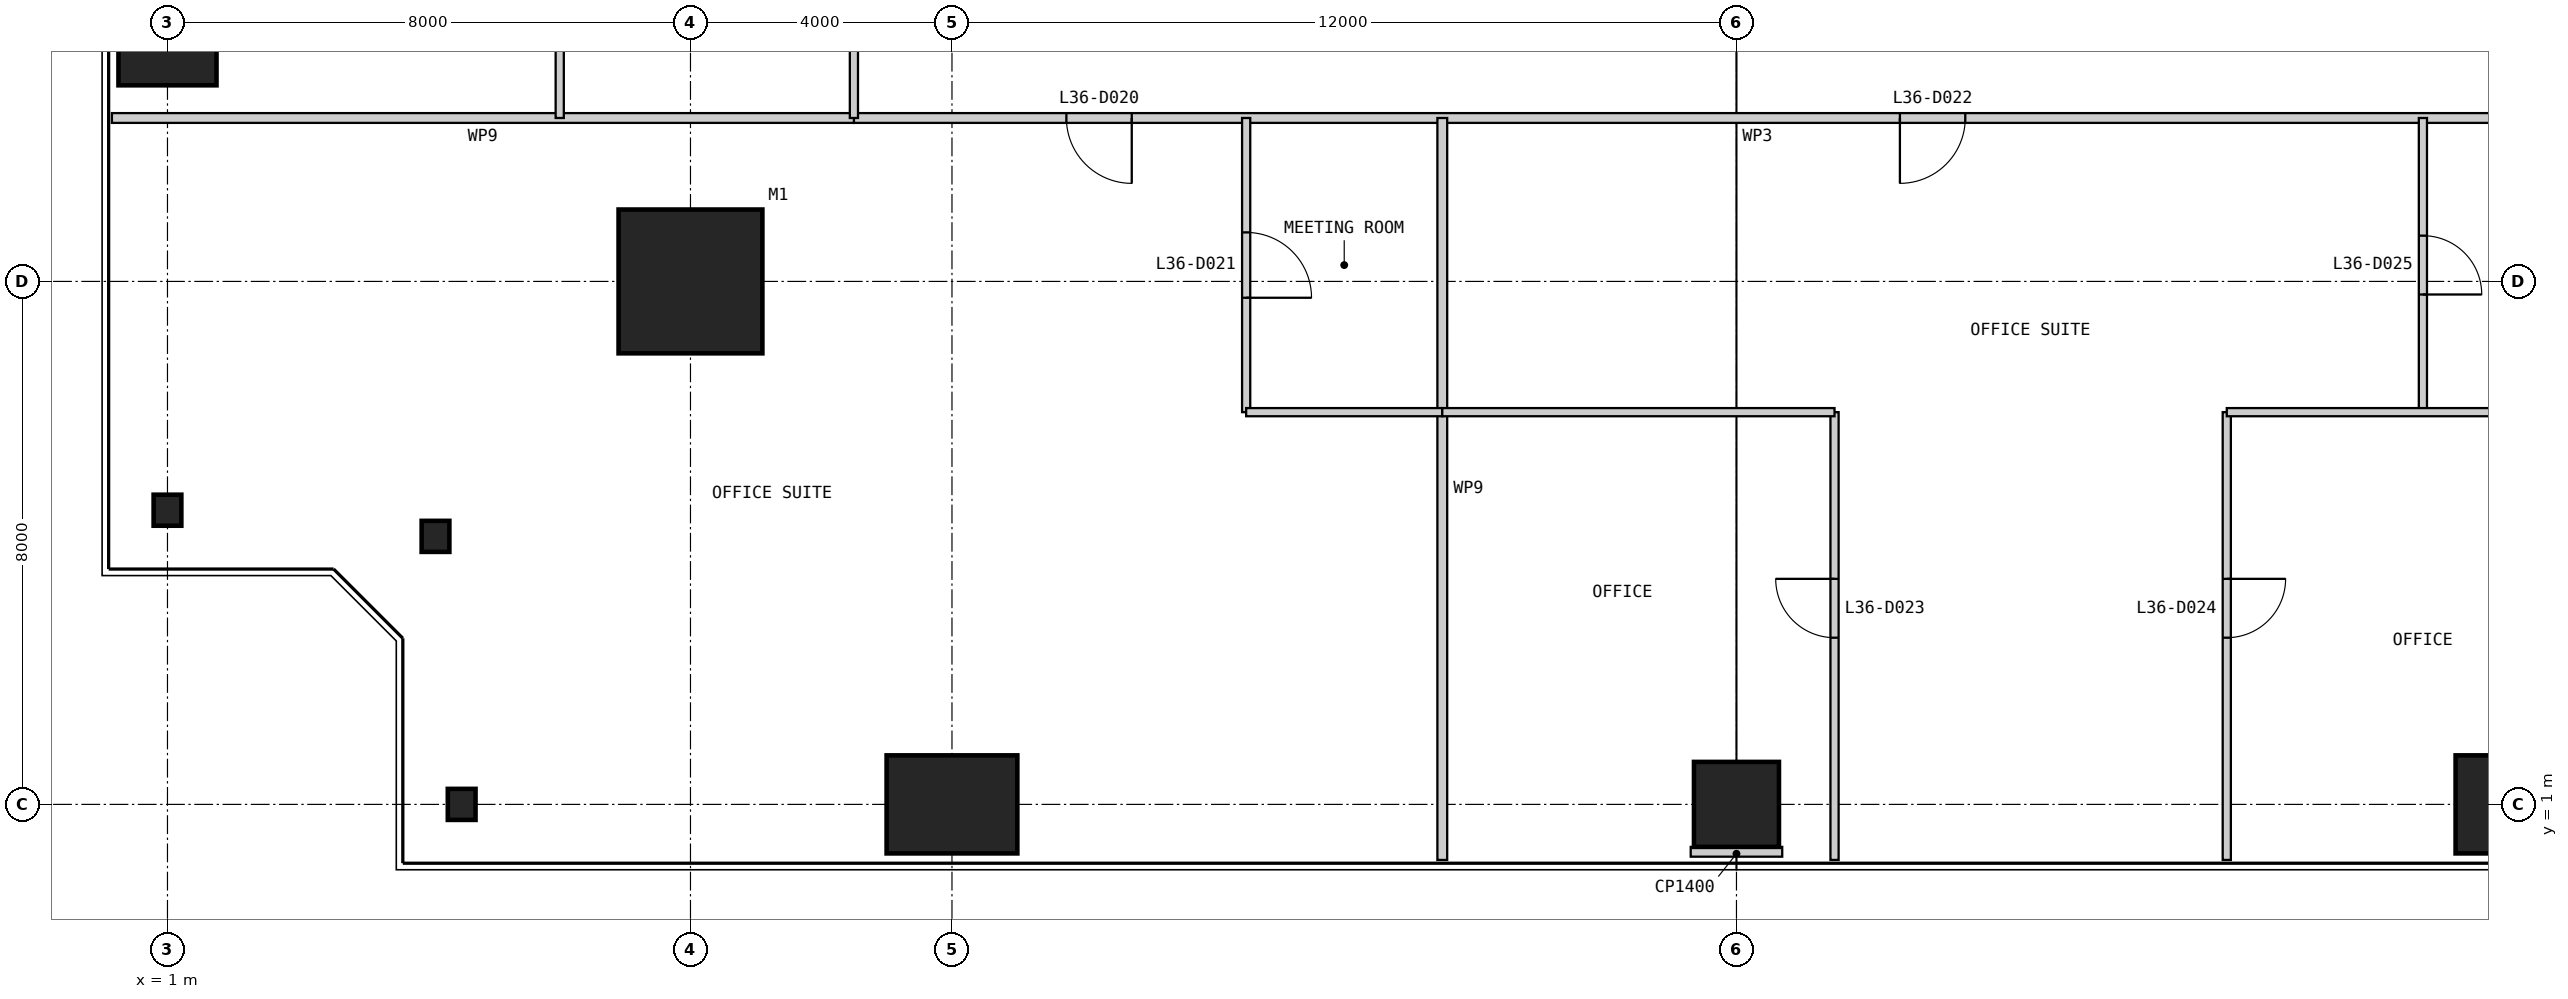
"""IFC4 building model, lengths in metres.
Left out: names, types, materials, properties, quantities, classifications, styles, units other than length and angle.
Written with IfcOpenShell. Run it as: python <this file> out.ifc"""

import sys

from ifc_helpers import new_model, si_unit, direction, frame, frame_2d, origin, origin_2d, place, context, subcontext, project, spatial, rectangle, i_section, extrude, element, fill, save


model = new_model("IFC4")
c1 = context("Model", 3, precision=1e-05, world=origin(), true_north=direction((0.0, 1.0)))
c2 = subcontext(c1, "Body", "Model", "MODEL_VIEW")
j1 = project(units=[si_unit("LENGTHUNIT", "METRE"), si_unit("PLANEANGLEUNIT", "RADIAN")], contexts=[c1])
p1 = place(None, origin())
s1 = spatial("IfcSite", under=j1, at=p1, CompositionType="ELEMENT")
p2 = place(p1, origin())
s2 = spatial("IfcBuilding", under=s1, at=p2, CompositionType="ELEMENT")
p3 = place(p2, frame((0.0, 0.0, 154.4)))
s3 = spatial("IfcBuildingStorey", under=s2, at=p3, CompositionType="ELEMENT", Elevation=154.4)
p4 = place(p3, frame((9.0, 9.0, 0.0), z_axis=(0.0, 0.0, 1.0), x_axis=(1.0, 0.0, 0.0)))
e1 = element("IfcColumn", 1, at=p4, inside=s3, PredefinedType="COLUMN", context=c2, shape_type="SweptSolid", body=[
    extrude(rectangle(XDim=2.2, YDim=2.2, at=origin_2d()), origin(), (0.0, 0.0, 1.0), 4.0),
])
p5 = place(p3, frame((5.5, 1.0, 0.0), z_axis=(0.0, 0.0, 1.0), x_axis=(1.0, 0.0, 0.0)))
e2 = element("IfcColumn", 2, at=p5, inside=s3, PredefinedType="COLUMN", context=c2, shape_type="SweptSolid", body=[
    extrude(i_section(OverallWidth=0.424, OverallDepth=0.475, WebThickness=0.048, FlangeThickness=0.077, at=origin_2d()), origin(), (0.0, 0.0, 1.0), 4.0),
])
p6 = place(p3, frame((13.0, 1.0, 0.0), z_axis=(0.0, 0.0, 1.0), x_axis=(1.0, 0.0, 0.0)))
e3 = element("IfcColumn", 3, at=p6, inside=s3, PredefinedType="COLUMN", context=c2, shape_type="SweptSolid", body=[
    extrude(rectangle(XDim=2.0, YDim=1.5, at=origin_2d()), origin(), (0.0, 0.0, 1.0), 4.0),
])
p7 = place(p3, frame((25.0, 1.0, 0.0), z_axis=(0.0, 0.0, 1.0), x_axis=(1.0, 0.0, 0.0)))
e4 = element("IfcColumn", 4, at=p7, inside=s3, PredefinedType="COLUMN", context=c2, shape_type="SweptSolid", body=[
    extrude(rectangle(XDim=1.3, YDim=1.3, at=origin_2d()), origin(), (0.0, 0.0, 1.0), 4.0),
])
p8 = place(p3, frame((37.0, 1.0, 0.0), z_axis=(0.0, 0.0, 1.0), x_axis=(1.0, 0.0, 0.0)))
e5 = element("IfcColumn", 5, at=p8, inside=s3, PredefinedType="COLUMN", context=c2, shape_type="SweptSolid", body=[
    extrude(rectangle(XDim=2.0, YDim=1.5, at=origin_2d()), origin(), (0.0, 0.0, 1.0), 4.0),
])
p9 = place(p3, frame((1.0, 13.0, 0.0), z_axis=(0.0, 0.0, 1.0), x_axis=(1.0, 0.0, 0.0)))
e6 = element("IfcColumn", 6, at=p9, inside=s3, PredefinedType="COLUMN", context=c2, shape_type="SweptSolid", body=[
    extrude(rectangle(XDim=1.5, YDim=2.0, at=origin_2d()), origin(), (0.0, 0.0, 1.0), 4.0),
])
for number, where, z_axis, x_axis in (
    (7, (1.0, 5.5, 0.0), (0.0, 0.0, 1.0), (1.0, 0.0, 0.0)),
    (8, (5.1, 5.1, 0.0), (0.0, 0.0, 1.0), (1.0, 0.0, 0.0)),
):
    element("IfcColumn", number, at=place(p3, frame(where, z_axis=z_axis, x_axis=x_axis)), inside=s3, PredefinedType="COLUMN", context=c2, shape_type="SweptSolid", body=[
        extrude(i_section(OverallWidth=0.424, OverallDepth=0.475, WebThickness=0.048, FlangeThickness=0.077, at=origin_2d()), origin(), (0.0, 0.0, 1.0), 4.0),
    ])
p10 = place(p3, frame((11.5, 11.5, 0.0), z_axis=(0.0, 0.0, 1.0), x_axis=(1.0, 0.0, 0.0)))
e9 = element("IfcWall", 9, at=p10, inside=s3, PredefinedType="PARTITIONING", context=c2, shape_type="SweptSolid", body=[
    extrude(rectangle(XDim=27.0, YDim=0.15, at=frame_2d((13.5, 0.0))), origin(), (0.0, 0.0, 1.0), 3.85),
])
p11 = place(p10, frame((3.25, 0.0, 0.0)))
e10 = element("IfcOpeningElement", 10, at=p11, cuts=e9, PredefinedType="OPENING", context=c2, shape_type="SweptSolid", body=[
    extrude(rectangle(XDim=1.0, YDim=2.2, at=frame_2d((0.5, 1.1))), frame((0.0, 0.085, 0.0), z_axis=(0.0, -1.0, 0.0), x_axis=(1.0, 0.0, 0.0)), (0.0, 0.0, 1.0), 0.17),
])
p12 = place(p10, frame((16.0, 0.0, 0.0)))
e11 = element("IfcOpeningElement", 11, at=p12, cuts=e9, PredefinedType="OPENING", context=c2, shape_type="SweptSolid", body=[
    extrude(rectangle(XDim=1.0, YDim=2.2, at=frame_2d((0.5, 1.1))), frame((0.0, 0.085, 0.0), z_axis=(0.0, -1.0, 0.0), x_axis=(1.0, 0.0, 0.0)), (0.0, 0.0, 1.0), 0.17),
])
p13 = place(p3, frame((0.15, 11.5, 0.0), z_axis=(0.0, 0.0, 1.0), x_axis=(1.0, 0.0, 0.0)))
e12 = element("IfcWall", 12, at=p13, inside=s3, PredefinedType="PARTITIONING", context=c2, shape_type="SweptSolid", body=[
    extrude(rectangle(XDim=11.35, YDim=0.15, at=frame_2d((5.675, 0.0))), origin(), (0.0, 0.0, 1.0), 3.85),
])
p14 = place(p3, frame((17.5, 7.0, 0.0), z_axis=(0.0, 0.0, 1.0), x_axis=(0.0, 1.0, 0.0)))
e13 = element("IfcWall", 13, at=p14, inside=s3, PredefinedType="PARTITIONING", context=c2, shape_type="SweptSolid", body=[
    extrude(rectangle(XDim=4.5, YDim=0.125, at=frame_2d((2.25, 0.0))), origin(), (0.0, 0.0, 1.0), 3.85),
])
p15 = place(p14, frame((1.75, 0.0, 0.0)))
e14 = element("IfcOpeningElement", 14, at=p15, cuts=e13, PredefinedType="OPENING", context=c2, shape_type="SweptSolid", body=[
    extrude(rectangle(XDim=1.0, YDim=2.2, at=frame_2d((0.5, 1.1))), frame((0.0, 0.073, 0.0), z_axis=(0.0, -1.0, 0.0), x_axis=(1.0, 0.0, 0.0)), (0.0, 0.0, 1.0), 0.145),
])
p16 = place(p3, frame((20.5, 0.15, 0.0), z_axis=(0.0, 0.0, 1.0), x_axis=(0.0, 1.0, 0.0)))
e15 = element("IfcWall", 15, at=p16, inside=s3, PredefinedType="PARTITIONING", context=c2, shape_type="SweptSolid", body=[
    extrude(rectangle(XDim=11.35, YDim=0.15, at=frame_2d((5.675, 0.0))), origin(), (0.0, 0.0, 1.0), 3.85),
])
p17 = place(p3, frame((26.5, 0.15, 0.0), z_axis=(0.0, 0.0, 1.0), x_axis=(0.0, 1.0, 0.0)))
e16 = element("IfcWall", 16, at=p17, inside=s3, PredefinedType="PARTITIONING", context=c2, shape_type="SweptSolid", body=[
    extrude(rectangle(XDim=6.85, YDim=0.125, at=frame_2d((3.425, 0.0))), origin(), (0.0, 0.0, 1.0), 3.85),
])
p18 = place(p17, frame((3.4, 0.0, 0.0)))
e17 = element("IfcOpeningElement", 17, at=p18, cuts=e16, PredefinedType="OPENING", context=c2, shape_type="SweptSolid", body=[
    extrude(rectangle(XDim=0.9, YDim=2.2, at=frame_2d((0.45, 1.1))), frame((0.0, 0.073, 0.0), z_axis=(0.0, -1.0, 0.0), x_axis=(1.0, 0.0, 0.0)), (0.0, 0.0, 1.0), 0.145),
])
p19 = place(p3, frame((32.5, 0.15, 0.0), z_axis=(0.0, 0.0, 1.0), x_axis=(0.0, 1.0, 0.0)))
e18 = element("IfcWall", 18, at=p19, inside=s3, PredefinedType="PARTITIONING", context=c2, shape_type="SweptSolid", body=[
    extrude(rectangle(XDim=6.85, YDim=0.125, at=frame_2d((3.425, 0.0))), origin(), (0.0, 0.0, 1.0), 3.85),
])
p20 = place(p19, frame((3.4, 0.0, 0.0)))
e19 = element("IfcOpeningElement", 19, at=p20, cuts=e18, PredefinedType="OPENING", context=c2, shape_type="SweptSolid", body=[
    extrude(rectangle(XDim=0.9, YDim=2.2, at=frame_2d((0.45, 1.1))), frame((0.0, 0.073, 0.0), z_axis=(0.0, -1.0, 0.0), x_axis=(1.0, 0.0, 0.0)), (0.0, 0.0, 1.0), 0.145),
])
p21 = place(p3, frame((35.5, 7.0, 0.0), z_axis=(0.0, 0.0, 1.0), x_axis=(0.0, 1.0, 0.0)))
e20 = element("IfcWall", 20, at=p21, inside=s3, PredefinedType="PARTITIONING", context=c2, shape_type="SweptSolid", body=[
    extrude(rectangle(XDim=4.5, YDim=0.125, at=frame_2d((2.25, 0.0))), origin(), (0.0, 0.0, 1.0), 3.85),
])
p22 = place(p21, frame((1.8, 0.0, 0.0)))
e21 = element("IfcOpeningElement", 21, at=p22, cuts=e20, PredefinedType="OPENING", context=c2, shape_type="SweptSolid", body=[
    extrude(rectangle(XDim=0.9, YDim=2.2, at=frame_2d((0.45, 1.1))), frame((0.0, 0.073, 0.0), z_axis=(0.0, -1.0, 0.0), x_axis=(1.0, 0.0, 0.0)), (0.0, 0.0, 1.0), 0.145),
])
p23 = place(p3, frame((17.5, 7.0, 0.0), z_axis=(0.0, 0.0, 1.0), x_axis=(1.0, 0.0, 0.0)))
e22 = element("IfcWall", 22, at=p23, inside=s3, PredefinedType="PARTITIONING", context=c2, shape_type="SweptSolid", body=[
    extrude(rectangle(XDim=3.0, YDim=0.125, at=frame_2d((1.5, 0.0))), origin(), (0.0, 0.0, 1.0), 3.85),
])
for number, where, z_axis, x_axis in (
    (23, (20.5, 7.0, 0.0), (0.0, 0.0, 1.0), (1.0, 0.0, 0.0)),
    (24, (32.5, 7.0, 0.0), (0.0, 0.0, 1.0), (1.0, 0.0, 0.0)),
):
    element("IfcWall", number, at=place(p3, frame(where, z_axis=z_axis, x_axis=x_axis)), inside=s3, PredefinedType="PARTITIONING", context=c2, shape_type="SweptSolid", body=[
        extrude(rectangle(XDim=6.0, YDim=0.125, at=frame_2d((3.0, 0.0))), origin(), (0.0, 0.0, 1.0), 3.85),
    ])
p24 = place(p3, frame((7.0, 17.5, 0.0), z_axis=(0.0, 0.0, 1.0), x_axis=(0.0, -1.0, 0.0)))
e25 = element("IfcWall", 25, at=p24, inside=s3, PredefinedType="PARTITIONING", context=c2, shape_type="SweptSolid", body=[
    extrude(rectangle(XDim=6.0, YDim=0.125, at=frame_2d((3.0, 0.0))), origin(), (0.0, 0.0, 1.0), 3.238),
])
p25 = place(p3, frame((11.5, 14.5, 0.0), z_axis=(0.0, 0.0, 1.0), x_axis=(0.0, -1.0, 0.0)))
e26 = element("IfcWall", 26, at=p25, inside=s3, PredefinedType="PARTITIONING", context=c2, shape_type="SweptSolid", body=[
    extrude(rectangle(XDim=3.0, YDim=0.125, at=frame_2d((1.5, 0.0))), origin(), (0.0, 0.0, 1.0), 3.85),
])
p26 = place(p3, frame((25.0, 0.2, 0.0), z_axis=(0.0, 0.0, 1.0), x_axis=(0.0, 1.0, 0.0)))
e27 = element("IfcWall", 27, at=p26, inside=s3, PredefinedType="PARTITIONING", context=c2, shape_type="SweptSolid", body=[
    extrude(rectangle(XDim=0.15, YDim=1.4, at=frame_2d((0.075, 0.0))), origin(), (0.0, 0.0, 1.0), 3.85),
])
p27 = place(p11, frame((1.0, 0.0, 0.0), z_axis=(0.0, 0.0, 1.0), x_axis=(-1.0, 0.0, 0.0)))
e28 = element("IfcDoor", 28, at=p27, inside=s3, OperationType="SINGLE_SWING_LEFT", PredefinedType="DOOR", context=c2, shape_type="SweptSolid", body=[
    extrude(rectangle(XDim=1.0, YDim=2.2, at=frame_2d((0.5, 1.1))), frame((0.0, 0.025, 0.0), z_axis=(0.0, -1.0, 0.0), x_axis=(1.0, 0.0, 0.0)), (0.0, 0.0, 1.0), 0.05),
])
fill(e10, e28)
p28 = place(p15, frame((1.0, 0.0, 0.0), z_axis=(0.0, 0.0, 1.0), x_axis=(-1.0, 0.0, 0.0)))
e29 = element("IfcDoor", 29, at=p28, inside=s3, OperationType="SINGLE_SWING_RIGHT", PredefinedType="DOOR", context=c2, shape_type="SweptSolid", body=[
    extrude(rectangle(XDim=1.0, YDim=2.2, at=frame_2d((0.5, 1.1))), frame((0.0, 0.025, 0.0), z_axis=(0.0, -1.0, 0.0), x_axis=(1.0, 0.0, 0.0)), (0.0, 0.0, 1.0), 0.05),
])
fill(e14, e29)
p29 = place(p12, frame((1.0, 0.0, 0.0), z_axis=(0.0, 0.0, 1.0), x_axis=(-1.0, 0.0, 0.0)))
e30 = element("IfcDoor", 30, at=p29, inside=s3, OperationType="SINGLE_SWING_RIGHT", PredefinedType="DOOR", context=c2, shape_type="SweptSolid", body=[
    extrude(rectangle(XDim=1.0, YDim=2.2, at=frame_2d((0.5, 1.1))), frame((0.0, 0.025, 0.0), z_axis=(0.0, -1.0, 0.0), x_axis=(1.0, 0.0, 0.0)), (0.0, 0.0, 1.0), 0.05),
])
fill(e11, e30)
p30 = place(p18, origin())
e31 = element("IfcDoor", 31, at=p30, inside=s3, OperationType="SINGLE_SWING_RIGHT", PredefinedType="DOOR", context=c2, shape_type="SweptSolid", body=[
    extrude(rectangle(XDim=0.9, YDim=2.2, at=frame_2d((0.45, 1.1))), frame((0.0, 0.025, 0.0), z_axis=(0.0, -1.0, 0.0), x_axis=(1.0, 0.0, 0.0)), (0.0, 0.0, 1.0), 0.05),
])
fill(e17, e31)
p31 = place(p20, frame((0.9, 0.0, 0.0), z_axis=(0.0, 0.0, 1.0), x_axis=(-1.0, 0.0, 0.0)))
e32 = element("IfcDoor", 32, at=p31, inside=s3, OperationType="SINGLE_SWING_LEFT", PredefinedType="DOOR", context=c2, shape_type="SweptSolid", body=[
    extrude(rectangle(XDim=0.9, YDim=2.2, at=frame_2d((0.45, 1.1))), frame((0.0, 0.025, 0.0), z_axis=(0.0, -1.0, 0.0), x_axis=(1.0, 0.0, 0.0)), (0.0, 0.0, 1.0), 0.05),
])
fill(e19, e32)
p32 = place(p22, frame((0.9, 0.0, 0.0), z_axis=(0.0, 0.0, 1.0), x_axis=(-1.0, 0.0, 0.0)))
e33 = element("IfcDoor", 33, at=p32, inside=s3, OperationType="SINGLE_SWING_RIGHT", PredefinedType="DOOR", context=c2, shape_type="SweptSolid", body=[
    extrude(rectangle(XDim=0.9, YDim=2.2, at=frame_2d((0.45, 1.1))), frame((0.0, 0.025, 0.0), z_axis=(0.0, -1.0, 0.0), x_axis=(1.0, 0.0, 0.0)), (0.0, 0.0, 1.0), 0.05),
])
fill(e21, e33)
save(model, sys.argv[1])
